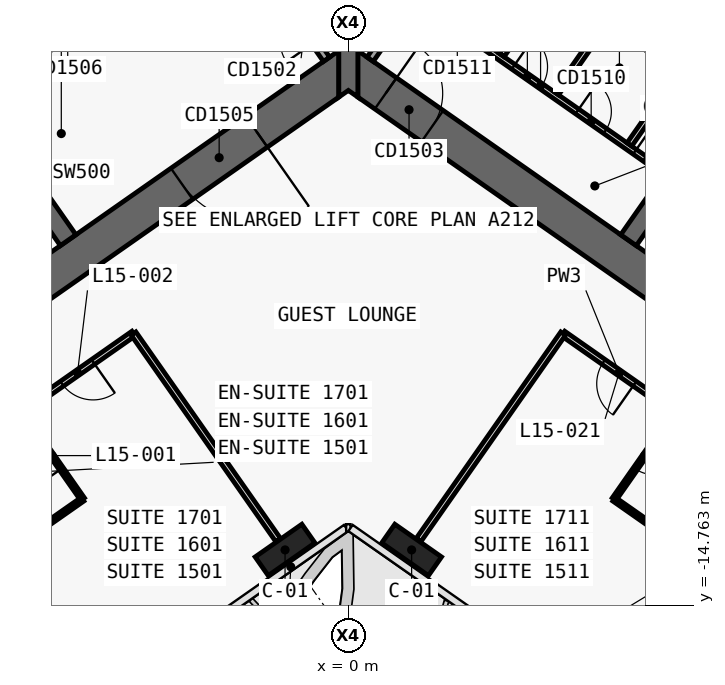
"""IFC4 building model, lengths in metres.
Left out: names, types, materials, properties, quantities, classifications, styles, units other than length and angle.
Written with IfcOpenShell. Run it as: python <this file> out.ifc"""

import sys

from ifc_helpers import new_model, si_unit, direction, frame, frame_2d, origin, origin_2d, place, context, subcontext, project, spatial, polyline, rectangle, outline, extrude, element, fill, save


model = new_model("IFC4")
c1 = context("Model", 3, precision=1e-05, world=origin(), true_north=direction((0.0, 1.0)))
c2 = subcontext(c1, "Body", "Model", "MODEL_VIEW")
j1 = project(units=[si_unit("LENGTHUNIT", "METRE"), si_unit("PLANEANGLEUNIT", "RADIAN")], contexts=[c1])
p1 = place(None, origin())
s1 = spatial("IfcSite", under=j1, at=p1, CompositionType="ELEMENT")
p2 = place(p1, origin())
s2 = spatial("IfcBuilding", under=s1, at=p2, CompositionType="ELEMENT")
p3 = place(p2, frame((0.0, 0.0, 79.7)))
s3 = spatial("IfcBuildingStorey", under=s2, at=p3, CompositionType="ELEMENT", Elevation=79.7)
p4 = place(p3, frame((0.037, 11.867, 0.0), z_axis=(0.0, 0.0, 1.0), x_axis=(-0.819155306259, -0.573571777746, 0.0)))
e1 = element("IfcWall", 1, at=p4, inside=s3, PredefinedType="SHEAR", context=c2, shape_type="SweptSolid", body=[
    extrude(outline(polyline([(33.837, 0.5), (0.7, 0.5), (0.0, -0.5), (33.837, -0.5), (33.837, 0.5)])), origin(), (0.0, 0.0, 1.0), 3.6),
])
p5 = place(p3, frame((0.037, -0.585, 0.0), z_axis=(0.0, 0.0, 1.0), x_axis=(-0.819157152511, -0.573569140985, 0.0)))
e2 = element("IfcWall", 2, at=p5, inside=s3, PredefinedType="SHEAR", context=c2, shape_type="SweptSolid", body=[
    extrude(outline(polyline([(26.695, 0.5), (0.7, 0.5), (0.0, -0.5), (26.695, -0.5), (26.695, 0.5)])), origin(), (0.0, 0.0, 1.0), 3.6),
])
p6 = place(p5, frame((2.995, 0.0, 0.0)))
e3 = element("IfcOpeningElement", 3, at=p6, cuts=e2, PredefinedType="OPENING", context=c2, shape_type="SweptSolid", body=[
    extrude(rectangle(XDim=2.4, YDim=2.1, at=frame_2d((1.2, 1.05))), frame((0.0, 0.51, 0.0), z_axis=(0.0, -1.0, 0.0), x_axis=(1.0, 0.0, 0.0)), (0.0, 0.0, 1.0), 1.02),
])
p7 = place(p5, frame((11.995, 0.0, 0.0)))
e4 = element("IfcOpeningElement", 4, at=p7, cuts=e2, PredefinedType="OPENING", context=c2, shape_type="SweptSolid", body=[
    extrude(rectangle(XDim=2.4, YDim=2.1, at=frame_2d((1.2, 1.05))), frame((0.0, 0.51, 0.0), z_axis=(0.0, -1.0, 0.0), x_axis=(1.0, 0.0, 0.0)), (0.0, 0.0, 1.0), 1.02),
])
p8 = place(p3, frame((-7.372, -5.162, 0.0), z_axis=(0.0, 0.0, 1.0), x_axis=(-0.573594173421, 0.819139624372, 0.0)))
e5 = element("IfcWall", 5, at=p8, inside=s3, PredefinedType="SHEAR", context=c2, shape_type="SweptSolid", body=[
    extrude(outline(polyline([(4.35, 0.25), (0.0, 0.25), (0.0, -0.25), (4.35, -0.25), (4.35, 0.25)])), origin(), (0.0, 0.0, 1.0), 3.6),
])
p9 = place(p3, frame((-2.638, 3.768, 0.0), z_axis=(0.0, 0.0, 1.0), x_axis=(-0.819148977158, -0.573580816643, 0.0)))
e6 = element("IfcWall", 6, at=p9, inside=s3, PredefinedType="SHEAR", context=c2, shape_type="SweptSolid", body=[
    extrude(outline(polyline([(26.0, 0.25), (0.0, 0.25), (0.0, -0.25), (26.0, -0.25), (26.0, 0.25)])), origin(), (0.0, 0.0, 1.0), 3.6),
])
p10 = place(p9, frame((1.169, 0.0, 0.0)))
e7 = element("IfcOpeningElement", 7, at=p10, cuts=e6, PredefinedType="OPENING", context=c2, shape_type="SweptSolid", body=[
    extrude(rectangle(XDim=1.1, YDim=2.1, at=frame_2d((0.55, 1.05))), frame((0.0, 0.26, 0.0), z_axis=(0.0, -1.0, 0.0), x_axis=(1.0, 0.0, 0.0)), (0.0, 0.0, 1.0), 0.52),
])
p11 = place(p9, frame((3.206, 0.0, 0.0)))
e8 = element("IfcOpeningElement", 8, at=p11, cuts=e6, PredefinedType="OPENING", context=c2, shape_type="SweptSolid", body=[
    extrude(rectangle(XDim=1.1, YDim=2.1, at=frame_2d((0.55, 1.05))), frame((0.0, 0.26, 0.0), z_axis=(0.0, -1.0, 0.0), x_axis=(1.0, 0.0, 0.0)), (0.0, 0.0, 1.0), 0.52),
])
p12 = place(p9, frame((5.244, 0.0, 0.0)))
e9 = element("IfcOpeningElement", 9, at=p12, cuts=e6, PredefinedType="OPENING", context=c2, shape_type="SweptSolid", body=[
    extrude(rectangle(XDim=1.1, YDim=2.1, at=frame_2d((0.55, 1.05))), frame((0.0, 0.26, 0.0), z_axis=(0.0, -1.0, 0.0), x_axis=(1.0, 0.0, 0.0)), (0.0, 0.0, 1.0), 0.52),
])
p13 = place(p9, frame((7.281, 0.0, 0.0)))
e10 = element("IfcOpeningElement", 10, at=p13, cuts=e6, PredefinedType="OPENING", context=c2, shape_type="SweptSolid", body=[
    extrude(rectangle(XDim=1.1, YDim=2.1, at=frame_2d((0.55, 1.05))), frame((0.0, 0.26, 0.0), z_axis=(0.0, -1.0, 0.0), x_axis=(1.0, 0.0, 0.0)), (0.0, 0.0, 1.0), 0.52),
])
p14 = place(p9, frame((9.688, 0.0, 0.0)))
e11 = element("IfcOpeningElement", 11, at=p14, cuts=e6, PredefinedType="OPENING", context=c2, shape_type="SweptSolid", body=[
    extrude(rectangle(XDim=1.1, YDim=2.1, at=frame_2d((0.55, 1.05))), frame((0.0, 0.26, 0.0), z_axis=(0.0, -1.0, 0.0), x_axis=(1.0, 0.0, 0.0)), (0.0, 0.0, 1.0), 0.52),
])
p15 = place(p9, frame((11.863, 0.0, 0.0)))
e12 = element("IfcOpeningElement", 12, at=p15, cuts=e6, PredefinedType="OPENING", context=c2, shape_type="SweptSolid", body=[
    extrude(rectangle(XDim=1.1, YDim=2.1, at=frame_2d((0.55, 1.05))), frame((0.0, 0.26, 0.0), z_axis=(0.0, -1.0, 0.0), x_axis=(1.0, 0.0, 0.0)), (0.0, 0.0, 1.0), 0.52),
])
p16 = place(p9, frame((14.038, 0.0, 0.0)))
e13 = element("IfcOpeningElement", 13, at=p16, cuts=e6, PredefinedType="OPENING", context=c2, shape_type="SweptSolid", body=[
    extrude(rectangle(XDim=1.1, YDim=2.1, at=frame_2d((0.55, 1.05))), frame((0.0, 0.26, 0.0), z_axis=(0.0, -1.0, 0.0), x_axis=(1.0, 0.0, 0.0)), (0.0, 0.0, 1.0), 0.52),
])
p17 = place(p9, frame((16.212, 0.0, 0.0)))
e14 = element("IfcOpeningElement", 14, at=p17, cuts=e6, PredefinedType="OPENING", context=c2, shape_type="SweptSolid", body=[
    extrude(rectangle(XDim=1.1, YDim=2.1, at=frame_2d((0.55, 1.05))), frame((0.0, 0.26, 0.0), z_axis=(0.0, -1.0, 0.0), x_axis=(1.0, 0.0, 0.0)), (0.0, 0.0, 1.0), 0.52),
])
p18 = place(p3, frame((-0.037, 11.867, 0.0), z_axis=(0.0, 0.0, 1.0), x_axis=(0.819155306259, -0.573571777746, 0.0)))
e15 = element("IfcWall", 15, at=p18, inside=s3, PredefinedType="SHEAR", context=c2, shape_type="SweptSolid", body=[
    extrude(outline(polyline([(33.837, 0.5), (0.0, 0.5), (0.7, -0.5), (33.837, -0.5), (33.837, 0.5)])), origin(), (0.0, 0.0, 1.0), 3.6),
])
p19 = place(p3, frame((-0.037, -0.585, 0.0), z_axis=(0.0, 0.0, 1.0), x_axis=(0.819157152511, -0.573569140985, 0.0)))
e16 = element("IfcWall", 16, at=p19, inside=s3, PredefinedType="SHEAR", context=c2, shape_type="SweptSolid", body=[
    extrude(outline(polyline([(26.695, 0.5), (0.0, 0.5), (0.7, -0.5), (26.695, -0.5), (26.695, 0.5)])), origin(), (0.0, 0.0, 1.0), 3.6),
])
p20 = place(p19, frame((1.245, 0.0, 0.0)))
e17 = element("IfcOpeningElement", 17, at=p20, cuts=e16, PredefinedType="OPENING", context=c2, shape_type="SweptSolid", body=[
    extrude(rectangle(XDim=1.5, YDim=2.1, at=frame_2d((0.75, 1.05))), frame((0.0, 0.51, 0.0), z_axis=(0.0, -1.0, 0.0), x_axis=(1.0, 0.0, 0.0)), (0.0, 0.0, 1.0), 1.02),
])
p21 = place(p19, frame((12.445, 0.0, 0.0)))
e18 = element("IfcOpeningElement", 18, at=p21, cuts=e16, PredefinedType="OPENING", context=c2, shape_type="SweptSolid", body=[
    extrude(rectangle(XDim=1.5, YDim=2.1, at=frame_2d((0.75, 1.05))), frame((0.0, 0.51, 0.0), z_axis=(0.0, -1.0, 0.0), x_axis=(1.0, 0.0, 0.0)), (0.0, 0.0, 1.0), 1.02),
])
p22 = place(p3, frame((7.372, -5.162, 0.0), z_axis=(0.0, 0.0, 1.0), x_axis=(0.573594173421, 0.819139624372, 0.0)))
e19 = element("IfcWall", 19, at=p22, inside=s3, PredefinedType="SHEAR", context=c2, shape_type="SweptSolid", body=[
    extrude(outline(polyline([(0.0, 0.25), (0.0, -0.25), (4.35, -0.25), (4.35, 0.25), (0.0, 0.25)])), origin(), (0.0, 0.0, 1.0), 3.6),
])
p23 = place(p3, frame((2.638, 3.768, 0.0), z_axis=(0.0, 0.0, 1.0), x_axis=(0.819148977158, -0.573580816643, 0.0)))
e20 = element("IfcWall", 20, at=p23, inside=s3, PredefinedType="SHEAR", context=c2, shape_type="SweptSolid", body=[
    extrude(outline(polyline([(0.0, 0.25), (0.0, -0.25), (26.0, -0.25), (26.0, 0.25), (0.0, 0.25)])), origin(), (0.0, 0.0, 1.0), 3.6),
])
p24 = place(p23, frame((9.637, 0.0, 0.0)))
e21 = element("IfcOpeningElement", 21, at=p24, cuts=e20, PredefinedType="OPENING", context=c2, shape_type="SweptSolid", body=[
    extrude(rectangle(XDim=1.2, YDim=2.1, at=frame_2d((0.6, 1.05))), frame((0.0, 0.26, 0.0), z_axis=(0.0, -1.0, 0.0), x_axis=(1.0, 0.0, 0.0)), (0.0, 0.0, 1.0), 0.52),
])
p25 = place(p23, frame((11.812, 0.0, 0.0)))
e22 = element("IfcOpeningElement", 22, at=p25, cuts=e20, PredefinedType="OPENING", context=c2, shape_type="SweptSolid", body=[
    extrude(rectangle(XDim=1.2, YDim=2.1, at=frame_2d((0.6, 1.05))), frame((0.0, 0.26, 0.0), z_axis=(0.0, -1.0, 0.0), x_axis=(1.0, 0.0, 0.0)), (0.0, 0.0, 1.0), 0.52),
])
p26 = place(p23, frame((13.988, 0.0, 0.0)))
e23 = element("IfcOpeningElement", 23, at=p26, cuts=e20, PredefinedType="OPENING", context=c2, shape_type="SweptSolid", body=[
    extrude(rectangle(XDim=1.2, YDim=2.1, at=frame_2d((0.6, 1.05))), frame((0.0, 0.26, 0.0), z_axis=(0.0, -1.0, 0.0), x_axis=(1.0, 0.0, 0.0)), (0.0, 0.0, 1.0), 0.52),
])
p27 = place(p23, frame((16.262, 0.0, 0.0)))
e24 = element("IfcOpeningElement", 24, at=p27, cuts=e20, PredefinedType="OPENING", context=c2, shape_type="SweptSolid", body=[
    extrude(rectangle(XDim=1.0, YDim=2.1, at=frame_2d((0.5, 1.05))), frame((0.0, 0.26, 0.0), z_axis=(0.0, -1.0, 0.0), x_axis=(1.0, 0.0, 0.0)), (0.0, 0.0, 1.0), 0.52),
])
p28 = place(p3, frame((0.0, -1.396, 0.0), z_axis=(0.0, 0.0, 1.0), x_axis=(0.0, 1.0, 0.0)))
e25 = element("IfcWall", 25, at=p28, inside=s3, PredefinedType="SHEAR", context=c2, shape_type="SweptSolid", body=[
    extrude(outline(polyline([(0.0, -0.25), (0.175, -0.25), (1.221, -0.25), (12.452, -0.25), (13.848, -0.25), (13.857, -0.25), (13.968, -0.172), (13.848, 0.0), (13.968, 0.172), (13.857, 0.25), (13.848, 0.25), (12.452, 0.25), (1.221, 0.25), (0.175, 0.25), (0.0, 0.25), (0.175, 0.0), (0.0, -0.25)])), origin(), (0.0, 0.0, 1.0), 3.6),
])
for number, where, z_axis, x_axis in (
    (26, (-1.665, -13.313, 0.0), (0.0, 0.0, 1.0), (-0.819, -0.574, 0.0)),
    (27, (1.665, -13.313, 0.0), (0.0, 0.0, 1.0), (0.819, -0.574, 0.0)),
):
    element("IfcColumn", number, at=place(p3, frame(where, z_axis=z_axis, x_axis=x_axis)), inside=s3, PredefinedType="COLUMN", context=c2, shape_type="SweptSolid", body=[
        extrude(rectangle(XDim=1.5, YDim=0.6, at=origin_2d()), origin(), (0.0, 0.0, 1.0), 3.6),
    ])
p29 = place(p3, frame((1.802, 1.179, 0.0), z_axis=(0.0, 0.0, 1.0), x_axis=(0.819142461705, -0.573590121456, 0.0)))
e28 = element("IfcWall", 28, at=p29, inside=s3, PredefinedType="PARTITIONING", context=c2, shape_type="SweptSolid", body=[
    extrude(rectangle(XDim=7.95, YDim=0.15, at=frame_2d((3.975, 0.0))), origin(), (0.0, 0.0, 1.0), 3.32),
])
p30 = place(p29, frame((0.85, 0.0, 0.0)))
e29 = element("IfcOpeningElement", 29, at=p30, cuts=e28, PredefinedType="OPENING", context=c2, shape_type="SweptSolid", body=[
    extrude(rectangle(XDim=0.9, YDim=2.1, at=frame_2d((0.45, 1.05))), frame((0.0, 0.085, 0.0), z_axis=(0.0, -1.0, 0.0), x_axis=(1.0, 0.0, 0.0)), (0.0, 0.0, 1.0), 0.17),
])
p31 = place(p29, frame((3.1, 0.0, 0.0)))
e30 = element("IfcOpeningElement", 30, at=p31, cuts=e28, PredefinedType="OPENING", context=c2, shape_type="SweptSolid", body=[
    extrude(rectangle(XDim=0.9, YDim=2.1, at=frame_2d((0.45, 1.05))), frame((0.0, 0.085, 0.0), z_axis=(0.0, -1.0, 0.0), x_axis=(1.0, 0.0, 0.0)), (0.0, 0.0, 1.0), 0.17),
])
p32 = place(p29, frame((5.15, 0.0, 0.0)))
e31 = element("IfcOpeningElement", 31, at=p32, cuts=e28, PredefinedType="OPENING", context=c2, shape_type="SweptSolid", body=[
    extrude(rectangle(XDim=0.9, YDim=2.1, at=frame_2d((0.45, 1.05))), frame((0.0, 0.085, 0.0), z_axis=(0.0, -1.0, 0.0), x_axis=(1.0, 0.0, 0.0)), (0.0, 0.0, 1.0), 0.17),
])
p33 = place(p29, frame((7.0, 0.0, 0.0)))
e32 = element("IfcOpeningElement", 32, at=p33, cuts=e28, PredefinedType="OPENING", context=c2, shape_type="SweptSolid", body=[
    extrude(rectangle(XDim=0.8, YDim=2.1, at=frame_2d((0.4, 1.05))), frame((0.0, 0.085, 0.0), z_axis=(0.0, -1.0, 0.0), x_axis=(1.0, 0.0, 0.0)), (0.0, 0.0, 1.0), 0.17),
])
for number, where, z_axis, x_axis in (
    (33, (4.037, -0.293, 0.0), (0.0, 0.0, 1.0), (0.574, 0.819, 0.0)),
    (34, (5.47, -1.297, 0.0), (0.0, 0.0, 1.0), (0.574, 0.819, 0.0)),
    (35, (7.395, -2.645, 0.0), (0.0, 0.0, 1.0), (0.574, 0.819, 0.0)),
):
    element("IfcWall", number, at=place(p3, frame(where, z_axis=z_axis, x_axis=x_axis)), inside=s3, PredefinedType="PARTITIONING", context=c2, shape_type="SweptSolid", body=[
        extrude(rectangle(XDim=2.275, YDim=0.15, at=frame_2d((1.137, 0.0))), origin(), (0.0, 0.0, 1.0), 3.32),
    ])
p34 = place(p3, frame((-0.573, -0.402, 0.0), z_axis=(0.0, 0.0, 1.0), x_axis=(-0.57356780395, 0.819158088694, 0.0)))
e36 = element("IfcWall", 36, at=p34, inside=s3, PredefinedType="SOLIDWALL", context=c2, shape_type="SweptSolid", body=[
    extrude(rectangle(XDim=4.35, YDim=0.2, at=frame_2d((2.175, 0.0))), origin(), (0.0, 0.0, 1.0), 3.32),
])
p35 = place(p34, frame((0.55, 0.0, 0.0)))
e37 = element("IfcOpeningElement", 37, at=p35, cuts=e36, PredefinedType="OPENING", context=c2, shape_type="SweptSolid", body=[
    extrude(rectangle(XDim=0.9, YDim=2.1, at=frame_2d((0.45, 1.05))), frame((0.0, 0.11, 0.0), z_axis=(0.0, -1.0, 0.0), x_axis=(1.0, 0.0, 0.0)), (0.0, 0.0, 1.0), 0.22),
])
p36 = place(p3, frame((0.573, -0.402, 0.0), z_axis=(0.0, 0.0, 1.0), x_axis=(0.57356780395, 0.819158088694, 0.0)))
e38 = element("IfcWall", 38, at=p36, inside=s3, PredefinedType="SOLIDWALL", context=c2, shape_type="SweptSolid", body=[
    extrude(rectangle(XDim=4.35, YDim=0.2, at=frame_2d((2.175, 0.0))), origin(), (0.0, 0.0, 1.0), 3.32),
])
p37 = place(p36, frame((0.55, 0.0, 0.0)))
e39 = element("IfcOpeningElement", 39, at=p37, cuts=e38, PredefinedType="OPENING", context=c2, shape_type="SweptSolid", body=[
    extrude(rectangle(XDim=0.9, YDim=2.1, at=frame_2d((0.45, 1.05))), frame((0.0, 0.11, 0.0), z_axis=(0.0, -1.0, 0.0), x_axis=(1.0, 0.0, 0.0)), (0.0, 0.0, 1.0), 0.22),
])
p38 = place(p3, frame((8.601, -9.685, 0.0), z_axis=(0.0, 0.0, 1.0), x_axis=(-0.819149096931, 0.573580645591, 0.0)))
e40 = element("IfcWall", 40, at=p38, inside=s3, PredefinedType="PARTITIONING", context=c2, shape_type="SweptSolid", body=[
    extrude(rectangle(XDim=3.601, YDim=0.15, at=frame_2d((1.8, 0.0))), origin(), (0.0, 0.0, 1.0), 2.6),
])
p39 = place(p38, frame((1.301, 0.0, 0.0)))
e41 = element("IfcOpeningElement", 41, at=p39, cuts=e40, PredefinedType="OPENING", context=c2, shape_type="SweptSolid", body=[
    extrude(rectangle(XDim=1.0, YDim=2.1, at=frame_2d((0.5, 1.05))), frame((0.0, 0.085, 0.0), z_axis=(0.0, -1.0, 0.0), x_axis=(1.0, 0.0, 0.0)), (0.0, 0.0, 1.0), 0.17),
])
p40 = place(p3, frame((-5.652, -7.62, 0.0), z_axis=(0.0, 0.0, 1.0), x_axis=(-0.819149096931, -0.573580645591, 0.0)))
e42 = element("IfcWall", 42, at=p40, inside=s3, PredefinedType="PARTITIONING", context=c2, shape_type="SweptSolid", body=[
    extrude(rectangle(XDim=3.601, YDim=0.15, at=frame_2d((1.8, 0.0))), origin(), (0.0, 0.0, 1.0), 2.6),
])
p41 = place(p40, frame((1.3, 0.0, 0.0)))
e43 = element("IfcOpeningElement", 43, at=p41, cuts=e42, PredefinedType="OPENING", context=c2, shape_type="SweptSolid", body=[
    extrude(rectangle(XDim=1.0, YDim=2.1, at=frame_2d((0.5, 1.05))), frame((0.0, 0.085, 0.0), z_axis=(0.0, -1.0, 0.0), x_axis=(1.0, 0.0, 0.0)), (0.0, 0.0, 1.0), 0.17),
])
p42 = place(p3, frame((8.6, -9.684, 0.0), z_axis=(0.0, 0.0, 1.0), x_axis=(-0.573550118428, -0.819170471667, 0.0)))
e44 = element("IfcWall", 44, at=p42, inside=s3, PredefinedType="PARTITIONING", context=c2, shape_type="SweptSolid", body=[
    extrude(rectangle(XDim=2.8, YDim=0.12, at=frame_2d((1.4, 0.0))), origin(), (0.0, 0.0, 1.0), 3.32),
])
p43 = place(p42, frame((0.975, 0.0, 0.0)))
e45 = element("IfcOpeningElement", 45, at=p43, cuts=e44, PredefinedType="OPENING", context=c2, shape_type="SweptSolid", body=[
    extrude(rectangle(XDim=0.85, YDim=2.05, at=frame_2d((0.425, 1.025))), frame((0.0, 0.07, 0.0), z_axis=(0.0, -1.0, 0.0), x_axis=(1.0, 0.0, 0.0)), (0.0, 0.0, 1.0), 0.14),
])
p44 = place(p3, frame((6.994, -11.979, 0.0), z_axis=(0.0, 0.0, 1.0), x_axis=(0.819188907105, -0.573523787192, 0.0)))
e46 = element("IfcWall", 46, at=p44, inside=s3, PredefinedType="PARTITIONING", context=c2, shape_type="SweptSolid", body=[
    extrude(rectangle(XDim=2.4, YDim=0.12, at=frame_2d((1.2, 0.0))), origin(), (0.0, 0.0, 1.0), 3.32),
])
p45 = place(p3, frame((8.96, -13.355, 0.0), z_axis=(0.0, 0.0, 1.0), x_axis=(-0.573564311442, -0.819160534108, 0.0)))
e47 = element("IfcWall", 47, at=p45, inside=s3, PredefinedType="PARTITIONING", context=c2, shape_type="SweptSolid", body=[
    extrude(rectangle(XDim=4.499, YDim=0.15, at=frame_2d((2.25, 0.0))), origin(), (0.0, 0.0, 1.0), 2.5),
])
p46 = place(p3, frame((1.849, -13.051, 0.0), z_axis=(0.0, 0.0, 1.0), x_axis=(0.57357355307, 0.819154063177, 0.0)))
e48 = element("IfcWall", 48, at=p46, inside=s3, PredefinedType="PARTITIONING", context=c2, shape_type="SweptSolid", body=[
    extrude(rectangle(XDim=6.63, YDim=0.15, at=frame_2d((3.315, 0.0))), origin(), (0.0, 0.0, 1.0), 2.6),
])
p47 = place(p3, frame((-1.849, -13.051, 0.0), z_axis=(0.0, 0.0, 1.0), x_axis=(-0.573575988258, 0.819152358047, 0.0)))
e49 = element("IfcWall", 49, at=p47, inside=s3, PredefinedType="PARTITIONING", context=c2, shape_type="SweptSolid", body=[
    extrude(rectangle(XDim=6.632, YDim=0.15, at=frame_2d((3.316, 0.0))), origin(), (0.0, 0.0, 1.0), 2.6),
])
p48 = place(p3, frame((-8.96, -13.355, 0.0), z_axis=(0.0, 0.0, 1.0), x_axis=(0.819188907105, 0.573523787192, 0.0)))
e50 = element("IfcWall", 50, at=p48, inside=s3, PredefinedType="PARTITIONING", context=c2, shape_type="SweptSolid", body=[
    extrude(rectangle(XDim=2.4, YDim=0.12, at=frame_2d((1.2, 0.0))), origin(), (0.0, 0.0, 1.0), 3.32),
])
p49 = place(p3, frame((-6.994, -11.978, 0.0), z_axis=(0.0, 0.0, 1.0), x_axis=(-0.573550118428, 0.819170471667, 0.0)))
e51 = element("IfcWall", 51, at=p49, inside=s3, PredefinedType="PARTITIONING", context=c2, shape_type="SweptSolid", body=[
    extrude(rectangle(XDim=2.8, YDim=0.12, at=frame_2d((1.4, 0.0))), origin(), (0.0, 0.0, 1.0), 3.32),
])
p50 = place(p49, frame((0.975, 0.0, 0.0)))
e52 = element("IfcOpeningElement", 52, at=p50, cuts=e51, PredefinedType="OPENING", context=c2, shape_type="SweptSolid", body=[
    extrude(rectangle(XDim=0.85, YDim=2.05, at=frame_2d((0.425, 1.025))), frame((0.0, 0.07, 0.0), z_axis=(0.0, -1.0, 0.0), x_axis=(1.0, 0.0, 0.0)), (0.0, 0.0, 1.0), 0.14),
])
p51 = place(p3, frame((-6.379, -17.041, 0.0), z_axis=(0.0, 0.0, 1.0), x_axis=(-0.573564311442, 0.819160534108, 0.0)))
e53 = element("IfcWall", 53, at=p51, inside=s3, PredefinedType="PARTITIONING", context=c2, shape_type="SweptSolid", body=[
    extrude(rectangle(XDim=4.499, YDim=0.15, at=frame_2d((2.25, 0.0))), origin(), (0.0, 0.0, 1.0), 2.5),
])
p52 = place(p6, origin())
e54 = element("IfcDoor", 54, at=p52, inside=s3, OperationType="DOUBLE_DOOR_SINGLE_SWING", PredefinedType="DOOR", context=c2, shape_type="SweptSolid", body=[
    extrude(rectangle(XDim=2.4, YDim=2.1, at=frame_2d((1.2, 1.05))), frame((0.0, 0.025, 0.0), z_axis=(0.0, -1.0, 0.0), x_axis=(1.0, 0.0, 0.0)), (0.0, 0.0, 1.0), 0.05),
])
fill(e3, e54)
p53 = place(p31, origin())
e55 = element("IfcDoor", 55, at=p53, inside=s3, OperationType="SINGLE_SWING_RIGHT", PredefinedType="DOOR", context=c2, shape_type="SweptSolid", body=[
    extrude(rectangle(XDim=0.9, YDim=2.1, at=frame_2d((0.45, 1.05))), frame((0.0, 0.025, 0.0), z_axis=(0.0, -1.0, 0.0), x_axis=(1.0, 0.0, 0.0)), (0.0, 0.0, 1.0), 0.05),
])
fill(e30, e55)
p54 = place(p32, origin())
e56 = element("IfcDoor", 56, at=p54, inside=s3, OperationType="SINGLE_SWING_RIGHT", PredefinedType="DOOR", context=c2, shape_type="SweptSolid", body=[
    extrude(rectangle(XDim=0.9, YDim=2.1, at=frame_2d((0.45, 1.05))), frame((0.0, 0.025, 0.0), z_axis=(0.0, -1.0, 0.0), x_axis=(1.0, 0.0, 0.0)), (0.0, 0.0, 1.0), 0.05),
])
fill(e31, e56)
p55 = place(p33, origin())
e57 = element("IfcDoor", 57, at=p55, inside=s3, OperationType="SINGLE_SWING_RIGHT", PredefinedType="DOOR", context=c2, shape_type="SweptSolid", body=[
    extrude(rectangle(XDim=0.8, YDim=2.1, at=frame_2d((0.4, 1.05))), frame((0.0, 0.025, 0.0), z_axis=(0.0, -1.0, 0.0), x_axis=(1.0, 0.0, 0.0)), (0.0, 0.0, 1.0), 0.05),
])
fill(e32, e57)
p56 = place(p20, origin())
e58 = element("IfcDoor", 58, at=p56, inside=s3, OperationType="SINGLE_SWING_RIGHT", PredefinedType="DOOR", context=c2, shape_type="SweptSolid", body=[
    extrude(rectangle(XDim=1.5, YDim=2.1, at=frame_2d((0.75, 1.05))), frame((0.0, 0.025, 0.0), z_axis=(0.0, -1.0, 0.0), x_axis=(1.0, 0.0, 0.0)), (0.0, 0.0, 1.0), 0.05),
])
fill(e17, e58)
p57 = place(p50, origin())
e59 = element("IfcDoor", 59, at=p57, inside=s3, OperationType="SINGLE_SWING_LEFT", PredefinedType="DOOR", context=c2, shape_type="SweptSolid", body=[
    extrude(rectangle(XDim=0.85, YDim=2.05, at=frame_2d((0.425, 1.025))), frame((0.0, 0.025, 0.0), z_axis=(0.0, -1.0, 0.0), x_axis=(1.0, 0.0, 0.0)), (0.0, 0.0, 1.0), 0.05),
])
fill(e52, e59)
p58 = place(p41, origin())
e60 = element("IfcDoor", 60, at=p58, inside=s3, OperationType="SINGLE_SWING_RIGHT", PredefinedType="DOOR", context=c2, shape_type="SweptSolid", body=[
    extrude(rectangle(XDim=1.0, YDim=2.1, at=frame_2d((0.5, 1.05))), frame((0.0, 0.025, 0.0), z_axis=(0.0, -1.0, 0.0), x_axis=(1.0, 0.0, 0.0)), (0.0, 0.0, 1.0), 0.05),
])
fill(e43, e60)
p59 = place(p43, origin())
e61 = element("IfcDoor", 61, at=p59, inside=s3, OperationType="SINGLE_SWING_RIGHT", PredefinedType="DOOR", context=c2, shape_type="SweptSolid", body=[
    extrude(rectangle(XDim=0.85, YDim=2.05, at=frame_2d((0.425, 1.025))), frame((0.0, 0.025, 0.0), z_axis=(0.0, -1.0, 0.0), x_axis=(1.0, 0.0, 0.0)), (0.0, 0.0, 1.0), 0.05),
])
fill(e45, e61)
p60 = place(p39, origin())
e62 = element("IfcDoor", 62, at=p60, inside=s3, OperationType="SINGLE_SWING_LEFT", PredefinedType="DOOR", context=c2, shape_type="SweptSolid", body=[
    extrude(rectangle(XDim=1.0, YDim=2.1, at=frame_2d((0.5, 1.05))), frame((0.0, 0.025, 0.0), z_axis=(0.0, -1.0, 0.0), x_axis=(1.0, 0.0, 0.0)), (0.0, 0.0, 1.0), 0.05),
])
fill(e41, e62)
save(model, sys.argv[1])
